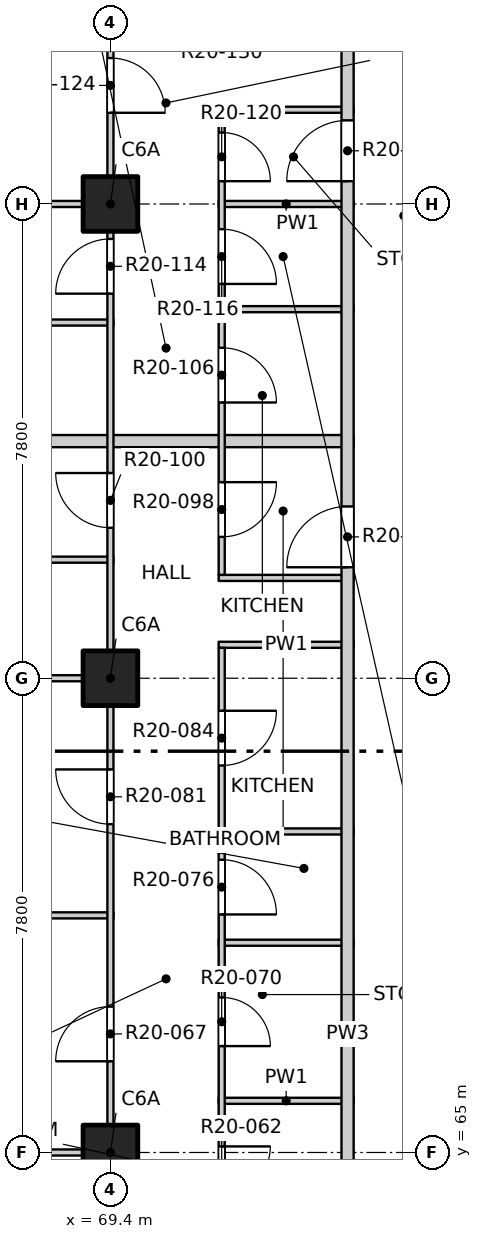
"""IFC4 building model, lengths in metres.
Left out: names, types, materials, properties, quantities, classifications, styles, units other than length and angle.
Written with IfcOpenShell. Run it as: python <this file> out.ifc"""

import sys

from ifc_helpers import new_model, si_unit, direction, frame, frame_2d, origin, origin_2d, place, context, subcontext, project, spatial, rectangle, extrude, element, fill, save


model = new_model("IFC4")
c1 = context("Model", 3, precision=1e-05, world=origin(), true_north=direction((0.0, 1.0)))
c2 = subcontext(c1, "Body", "Model", "MODEL_VIEW")
j1 = project(units=[si_unit("LENGTHUNIT", "METRE"), si_unit("PLANEANGLEUNIT", "RADIAN")], contexts=[c1])
p1 = place(None, origin())
s1 = spatial("IfcSite", under=j1, at=p1, CompositionType="ELEMENT")
p2 = place(p1, origin())
s2 = spatial("IfcBuilding", under=s1, at=p2, CompositionType="ELEMENT")
p3 = place(p2, frame((0.0, 0.0, 204.1)))
s3 = spatial("IfcBuildingStorey", under=s2, at=p3, CompositionType="ELEMENT", Elevation=204.1)
for number, where, z_axis, x_axis in (
    (1, (69.4, 65.0, -0.25), (0.0, 0.0, 1.0), (1.0, 0.0, 0.0)),
    (2, (69.4, 72.8, -0.25), (0.0, 0.0, 1.0), (1.0, 0.0, 0.0)),
    (3, (69.4, 80.6, -0.25), (0.0, 0.0, 1.0), (1.0, 0.0, 0.0)),
):
    element("IfcColumn", number, at=place(p3, frame(where, z_axis=z_axis, x_axis=x_axis)), inside=s3, PredefinedType="COLUMN", context=c2, shape_type="SweptSolid", body=[
        extrude(rectangle(XDim=0.9, YDim=0.9, at=origin_2d()), origin(), (0.0, 0.0, 1.0), 3.4),
    ])
p4 = place(p3, frame((61.9, 65.0, 0.0), z_axis=(0.0, 0.0, 1.0), x_axis=(1.0, 0.0, 0.0)))
e4 = element("IfcWall", 4, at=p4, inside=s3, PredefinedType="PARTITIONING", context=c2, shape_type="SweptSolid", body=[
    extrude(rectangle(XDim=7.55, YDim=0.1, at=frame_2d((3.775, 0.0))), origin(), (0.0, 0.0, 1.0), 3.15),
])
for number, where, z_axis, x_axis in (
    (5, (71.18, 65.85, 0.0), (0.0, 0.0, 1.0), (1.0, 0.0, 0.0)),
    (6, (71.18, 68.45, 0.0), (0.0, 0.0, 1.0), (1.0, 0.0, 0.0)),
):
    element("IfcWall", number, at=place(p3, frame(where, z_axis=z_axis, x_axis=x_axis)), inside=s3, PredefinedType="PARTITIONING", context=c2, shape_type="SweptSolid", body=[
        extrude(rectangle(XDim=2.22, YDim=0.1, at=frame_2d((1.11, 0.0))), origin(), (0.0, 0.0, 1.0), 3.15),
    ])
p5 = place(p3, frame((61.9, 68.9, 0.0), z_axis=(0.0, 0.0, 1.0), x_axis=(1.0, 0.0, 0.0)))
e7 = element("IfcWall", 7, at=p5, inside=s3, PredefinedType="PARTITIONING", context=c2, shape_type="SweptSolid", body=[
    extrude(rectangle(XDim=7.55, YDim=0.1, at=frame_2d((3.775, 0.0))), origin(), (0.0, 0.0, 1.0), 2.55),
])
p6 = place(p3, frame((71.18, 70.28, 0.0), z_axis=(0.0, 0.0, 1.0), x_axis=(1.0, 0.0, 0.0)))
e8 = element("IfcWall", 8, at=p6, inside=s3, PredefinedType="PARTITIONING", context=c2, shape_type="SweptSolid", body=[
    extrude(rectangle(XDim=2.22, YDim=0.1, at=frame_2d((1.11, 0.0))), origin(), (0.0, 0.0, 1.0), 3.15),
])
p7 = place(p3, frame((61.9, 72.8, 0.0), z_axis=(0.0, 0.0, 1.0), x_axis=(1.0, 0.0, 0.0)))
e9 = element("IfcWall", 9, at=p7, inside=s3, PredefinedType="PARTITIONING", context=c2, shape_type="SweptSolid", body=[
    extrude(rectangle(XDim=7.55, YDim=0.1, at=frame_2d((3.775, 0.0))), origin(), (0.0, 0.0, 1.0), 3.15),
])
for number, where, z_axis, x_axis in (
    (10, (71.18, 73.35, 0.0), (0.0, 0.0, 1.0), (1.0, 0.0, 0.0)),
    (11, (71.18, 74.45, 0.0), (0.0, 0.0, 1.0), (1.0, 0.0, 0.0)),
):
    element("IfcWall", number, at=place(p3, frame(where, z_axis=z_axis, x_axis=x_axis)), inside=s3, PredefinedType="PARTITIONING", context=c2, shape_type="SweptSolid", body=[
        extrude(rectangle(XDim=2.22, YDim=0.1, at=frame_2d((1.11, 0.0))), origin(), (0.0, 0.0, 1.0), 3.15),
    ])
p8 = place(p3, frame((65.75, 74.75, 0.0), z_axis=(0.0, 0.0, 1.0), x_axis=(1.0, 0.0, 0.0)))
e12 = element("IfcWall", 12, at=p8, inside=s3, PredefinedType="PARTITIONING", context=c2, shape_type="SweptSolid", body=[
    extrude(rectangle(XDim=3.7, YDim=0.1, at=frame_2d((1.85, 0.0))), origin(), (0.0, 0.0, 1.0), 3.15),
])
p9 = place(p3, frame((61.9, 76.7, 0.0), z_axis=(0.0, 0.0, 1.0), x_axis=(1.0, 0.0, 0.0)))
e13 = element("IfcWall", 13, at=p9, inside=s3, PredefinedType="PARTITIONING", context=c2, shape_type="SweptSolid", body=[
    extrude(rectangle(XDim=11.5, YDim=0.2, at=frame_2d((5.75, 0.0))), origin(), (0.0, 0.0, 1.0), 2.55),
])
p10 = place(p3, frame((65.75, 78.65, 0.0), z_axis=(0.0, 0.0, 1.0), x_axis=(1.0, 0.0, 0.0)))
e14 = element("IfcWall", 14, at=p10, inside=s3, PredefinedType="PARTITIONING", context=c2, shape_type="SweptSolid", body=[
    extrude(rectangle(XDim=3.7, YDim=0.1, at=frame_2d((1.85, 0.0))), origin(), (0.0, 0.0, 1.0), 3.15),
])
p11 = place(p3, frame((71.18, 78.87, 0.0), z_axis=(0.0, 0.0, 1.0), x_axis=(1.0, 0.0, 0.0)))
e15 = element("IfcWall", 15, at=p11, inside=s3, PredefinedType="PARTITIONING", context=c2, shape_type="SweptSolid", body=[
    extrude(rectangle(XDim=2.22, YDim=0.1, at=frame_2d((1.11, 0.0))), origin(), (0.0, 0.0, 1.0), 3.15),
])
p12 = place(p3, frame((61.9, 80.6, 0.0), z_axis=(0.0, 0.0, 1.0), x_axis=(1.0, 0.0, 0.0)))
e16 = element("IfcWall", 16, at=p12, inside=s3, PredefinedType="PARTITIONING", context=c2, shape_type="SweptSolid", body=[
    extrude(rectangle(XDim=7.55, YDim=0.1, at=frame_2d((3.775, 0.0))), origin(), (0.0, 0.0, 1.0), 3.15),
])
for number, where, z_axis, x_axis in (
    (17, (71.18, 80.6, 0.0), (0.0, 0.0, 1.0), (1.0, 0.0, 0.0)),
    (18, (71.18, 82.15, 0.0), (0.0, 0.0, 1.0), (1.0, 0.0, 0.0)),
):
    element("IfcWall", number, at=place(p3, frame(where, z_axis=z_axis, x_axis=x_axis)), inside=s3, PredefinedType="PARTITIONING", context=c2, shape_type="SweptSolid", body=[
        extrude(rectangle(XDim=2.22, YDim=0.1, at=frame_2d((1.11, 0.0))), origin(), (0.0, 0.0, 1.0), 3.15),
    ])
p13 = place(p3, frame((69.4, 41.9, 0.0), z_axis=(0.0, 0.0, 1.0), x_axis=(0.0, 1.0, 0.0)))
e19 = element("IfcWall", 19, at=p13, inside=s3, PredefinedType="PARTITIONING", context=c2, shape_type="SweptSolid", body=[
    extrude(rectangle(XDim=46.2, YDim=0.1, at=frame_2d((23.1, 0.0))), origin(), (0.0, 0.0, 1.0), 3.15),
])
p14 = place(p13, frame((1.2, 0.0, 0.0)))
e20 = element("IfcOpeningElement", 20, at=p14, cuts=e19, PredefinedType="OPENING", context=c2, shape_type="SweptSolid", body=[
    extrude(rectangle(XDim=0.9, YDim=2.1, at=frame_2d((0.45, 1.05))), frame((0.0, 0.06, 0.0), z_axis=(0.0, -1.0, 0.0), x_axis=(1.0, 0.0, 0.0)), (0.0, 0.0, 1.0), 0.12),
])
p15 = place(p13, frame((5.1, 0.0, 0.0)))
e21 = element("IfcOpeningElement", 21, at=p15, cuts=e19, PredefinedType="OPENING", context=c2, shape_type="SweptSolid", body=[
    extrude(rectangle(XDim=0.9, YDim=2.1, at=frame_2d((0.45, 1.05))), frame((0.0, 0.06, 0.0), z_axis=(0.0, -1.0, 0.0), x_axis=(1.0, 0.0, 0.0)), (0.0, 0.0, 1.0), 0.12),
])
p16 = place(p13, frame((9.975, 0.0, 0.0)))
e22 = element("IfcOpeningElement", 22, at=p16, cuts=e19, PredefinedType="OPENING", context=c2, shape_type="SweptSolid", body=[
    extrude(rectangle(XDim=0.9, YDim=2.1, at=frame_2d((0.45, 1.05))), frame((0.0, 0.06, 0.0), z_axis=(0.0, -1.0, 0.0), x_axis=(1.0, 0.0, 0.0)), (0.0, 0.0, 1.0), 0.12),
])
p17 = place(p13, frame((12.9, 0.0, 0.0)))
e23 = element("IfcOpeningElement", 23, at=p17, cuts=e19, PredefinedType="OPENING", context=c2, shape_type="SweptSolid", body=[
    extrude(rectangle(XDim=0.9, YDim=2.1, at=frame_2d((0.45, 1.05))), frame((0.0, 0.06, 0.0), z_axis=(0.0, -1.0, 0.0), x_axis=(1.0, 0.0, 0.0)), (0.0, 0.0, 1.0), 0.12),
])
p18 = place(p13, frame((17.775, 0.0, 0.0)))
e24 = element("IfcOpeningElement", 24, at=p18, cuts=e19, PredefinedType="OPENING", context=c2, shape_type="SweptSolid", body=[
    extrude(rectangle(XDim=0.9, YDim=2.1, at=frame_2d((0.45, 1.05))), frame((0.0, 0.06, 0.0), z_axis=(0.0, -1.0, 0.0), x_axis=(1.0, 0.0, 0.0)), (0.0, 0.0, 1.0), 0.12),
])
p19 = place(p13, frame((21.625, 0.0, 0.0)))
e25 = element("IfcOpeningElement", 25, at=p19, cuts=e19, PredefinedType="OPENING", context=c2, shape_type="SweptSolid", body=[
    extrude(rectangle(XDim=0.9, YDim=2.1, at=frame_2d((0.45, 1.05))), frame((0.0, 0.06, 0.0), z_axis=(0.0, -1.0, 0.0), x_axis=(1.0, 0.0, 0.0)), (0.0, 0.0, 1.0), 0.12),
])
p20 = place(p13, frame((24.6, 0.0, 0.0)))
e26 = element("IfcOpeningElement", 26, at=p20, cuts=e19, PredefinedType="OPENING", context=c2, shape_type="SweptSolid", body=[
    extrude(rectangle(XDim=0.9, YDim=2.1, at=frame_2d((0.45, 1.05))), frame((0.0, 0.06, 0.0), z_axis=(0.0, -1.0, 0.0), x_axis=(1.0, 0.0, 0.0)), (0.0, 0.0, 1.0), 0.12),
])
p21 = place(p13, frame((28.5, 0.0, 0.0)))
e27 = element("IfcOpeningElement", 27, at=p21, cuts=e19, PredefinedType="OPENING", context=c2, shape_type="SweptSolid", body=[
    extrude(rectangle(XDim=0.9, YDim=2.1, at=frame_2d((0.45, 1.05))), frame((0.0, 0.06, 0.0), z_axis=(0.0, -1.0, 0.0), x_axis=(1.0, 0.0, 0.0)), (0.0, 0.0, 1.0), 0.12),
])
p22 = place(p13, frame((33.375, 0.0, 0.0)))
e28 = element("IfcOpeningElement", 28, at=p22, cuts=e19, PredefinedType="OPENING", context=c2, shape_type="SweptSolid", body=[
    extrude(rectangle(XDim=0.9, YDim=2.1, at=frame_2d((0.45, 1.05))), frame((0.0, 0.06, 0.0), z_axis=(0.0, -1.0, 0.0), x_axis=(1.0, 0.0, 0.0)), (0.0, 0.0, 1.0), 0.12),
])
p23 = place(p13, frame((37.225, 0.0, 0.0)))
e29 = element("IfcOpeningElement", 29, at=p23, cuts=e19, PredefinedType="OPENING", context=c2, shape_type="SweptSolid", body=[
    extrude(rectangle(XDim=0.9, YDim=2.1, at=frame_2d((0.45, 1.05))), frame((0.0, 0.06, 0.0), z_axis=(0.0, -1.0, 0.0), x_axis=(1.0, 0.0, 0.0)), (0.0, 0.0, 1.0), 0.12),
])
p24 = place(p13, frame((40.2, 0.0, 0.0)))
e30 = element("IfcOpeningElement", 30, at=p24, cuts=e19, PredefinedType="OPENING", context=c2, shape_type="SweptSolid", body=[
    extrude(rectangle(XDim=0.9, YDim=2.1, at=frame_2d((0.45, 1.05))), frame((0.0, 0.06, 0.0), z_axis=(0.0, -1.0, 0.0), x_axis=(1.0, 0.0, 0.0)), (0.0, 0.0, 1.0), 0.12),
])
p25 = place(p13, frame((44.1, 0.0, 0.0)))
e31 = element("IfcOpeningElement", 31, at=p25, cuts=e19, PredefinedType="OPENING", context=c2, shape_type="SweptSolid", body=[
    extrude(rectangle(XDim=0.9, YDim=2.1, at=frame_2d((0.45, 1.05))), frame((0.0, 0.06, 0.0), z_axis=(0.0, -1.0, 0.0), x_axis=(1.0, 0.0, 0.0)), (0.0, 0.0, 1.0), 0.12),
])
p26 = place(p3, frame((71.23, 55.05, 0.0), z_axis=(0.0, 0.0, 1.0), x_axis=(0.0, 1.0, 0.0)))
e32 = element("IfcWall", 32, at=p26, inside=s3, PredefinedType="PARTITIONING", context=c2, shape_type="SweptSolid", body=[
    extrude(rectangle(XDim=18.25, YDim=0.1, at=frame_2d((9.125, 0.0))), origin(), (0.0, 0.0, 1.0), 3.15),
])
p27 = place(p26, frame((0.4, 0.0, 0.0)))
e33 = element("IfcOpeningElement", 33, at=p27, cuts=e32, PredefinedType="OPENING", context=c2, shape_type="SweptSolid", body=[
    extrude(rectangle(XDim=0.9, YDim=2.1, at=frame_2d((0.45, 1.05))), frame((0.0, 0.06, 0.0), z_axis=(0.0, -1.0, 0.0), x_axis=(1.0, 0.0, 0.0)), (0.0, 0.0, 1.0), 0.12),
])
p28 = place(p26, frame((2.425, 0.0, 0.0)))
e34 = element("IfcOpeningElement", 34, at=p28, cuts=e32, PredefinedType="OPENING", context=c2, shape_type="SweptSolid", body=[
    extrude(rectangle(XDim=0.8, YDim=2.1, at=frame_2d((0.4, 1.05))), frame((0.0, 0.06, 0.0), z_axis=(0.0, -1.0, 0.0), x_axis=(1.0, 0.0, 0.0)), (0.0, 0.0, 1.0), 0.12),
])
p29 = place(p26, frame((4.575, 0.0, 0.0)))
e35 = element("IfcOpeningElement", 35, at=p29, cuts=e32, PredefinedType="OPENING", context=c2, shape_type="SweptSolid", body=[
    extrude(rectangle(XDim=0.8, YDim=2.1, at=frame_2d((0.4, 1.05))), frame((0.0, 0.06, 0.0), z_axis=(0.0, -1.0, 0.0), x_axis=(1.0, 0.0, 0.0)), (0.0, 0.0, 1.0), 0.12),
])
p30 = place(p26, frame((6.875, 0.0, 0.0)))
e36 = element("IfcOpeningElement", 36, at=p30, cuts=e32, PredefinedType="OPENING", context=c2, shape_type="SweptSolid", body=[
    extrude(rectangle(XDim=0.8, YDim=2.1, at=frame_2d((0.4, 1.05))), frame((0.0, 0.06, 0.0), z_axis=(0.0, -1.0, 0.0), x_axis=(1.0, 0.0, 0.0)), (0.0, 0.0, 1.0), 0.12),
])
p31 = place(p26, frame((9.25, 0.0, 0.0)))
e37 = element("IfcOpeningElement", 37, at=p31, cuts=e32, PredefinedType="OPENING", context=c2, shape_type="SweptSolid", body=[
    extrude(rectangle(XDim=0.8, YDim=2.1, at=frame_2d((0.4, 1.05))), frame((0.0, 0.06, 0.0), z_axis=(0.0, -1.0, 0.0), x_axis=(1.0, 0.0, 0.0)), (0.0, 0.0, 1.0), 0.12),
])
p32 = place(p26, frame((11.7, 0.0, 0.0)))
e38 = element("IfcOpeningElement", 38, at=p32, cuts=e32, PredefinedType="OPENING", context=c2, shape_type="SweptSolid", body=[
    extrude(rectangle(XDim=0.8, YDim=2.1, at=frame_2d((0.4, 1.05))), frame((0.0, 0.06, 0.0), z_axis=(0.0, -1.0, 0.0), x_axis=(1.0, 0.0, 0.0)), (0.0, 0.0, 1.0), 0.12),
])
p33 = place(p26, frame((13.865, 0.0, 0.0)))
e39 = element("IfcOpeningElement", 39, at=p33, cuts=e32, PredefinedType="OPENING", context=c2, shape_type="SweptSolid", body=[
    extrude(rectangle(XDim=0.9, YDim=2.1, at=frame_2d((0.45, 1.05))), frame((0.0, 0.06, 0.0), z_axis=(0.0, -1.0, 0.0), x_axis=(1.0, 0.0, 0.0)), (0.0, 0.0, 1.0), 0.12),
])
p34 = place(p26, frame((16.315, 0.0, 0.0)))
e40 = element("IfcOpeningElement", 40, at=p34, cuts=e32, PredefinedType="OPENING", context=c2, shape_type="SweptSolid", body=[
    extrude(rectangle(XDim=0.9, YDim=2.1, at=frame_2d((0.45, 1.05))), frame((0.0, 0.06, 0.0), z_axis=(0.0, -1.0, 0.0), x_axis=(1.0, 0.0, 0.0)), (0.0, 0.0, 1.0), 0.12),
])
p35 = place(p3, frame((71.23, 74.5, 0.0), z_axis=(0.0, 0.0, 1.0), x_axis=(0.0, 1.0, 0.0)))
e41 = element("IfcWall", 41, at=p35, inside=s3, PredefinedType="PARTITIONING", context=c2, shape_type="SweptSolid", body=[
    extrude(rectangle(XDim=7.6, YDim=0.1, at=frame_2d((3.8, 0.0))), origin(), (0.0, 0.0, 1.0), 3.15),
])
p36 = place(p35, frame((0.625, 0.0, 0.0)))
e42 = element("IfcOpeningElement", 42, at=p36, cuts=e41, PredefinedType="OPENING", context=c2, shape_type="SweptSolid", body=[
    extrude(rectangle(XDim=0.9, YDim=2.1, at=frame_2d((0.45, 1.05))), frame((0.0, 0.06, 0.0), z_axis=(0.0, -1.0, 0.0), x_axis=(1.0, 0.0, 0.0)), (0.0, 0.0, 1.0), 0.12),
])
p37 = place(p35, frame((2.835, 0.0, 0.0)))
e43 = element("IfcOpeningElement", 43, at=p37, cuts=e41, PredefinedType="OPENING", context=c2, shape_type="SweptSolid", body=[
    extrude(rectangle(XDim=0.9, YDim=2.1, at=frame_2d((0.45, 1.05))), frame((0.0, 0.06, 0.0), z_axis=(0.0, -1.0, 0.0), x_axis=(1.0, 0.0, 0.0)), (0.0, 0.0, 1.0), 0.12),
])
p38 = place(p35, frame((4.785, 0.0, 0.0)))
e44 = element("IfcOpeningElement", 44, at=p38, cuts=e41, PredefinedType="OPENING", context=c2, shape_type="SweptSolid", body=[
    extrude(rectangle(XDim=0.9, YDim=2.1, at=frame_2d((0.45, 1.05))), frame((0.0, 0.06, 0.0), z_axis=(0.0, -1.0, 0.0), x_axis=(1.0, 0.0, 0.0)), (0.0, 0.0, 1.0), 0.12),
])
p39 = place(p35, frame((6.475, 0.0, 0.0)))
e45 = element("IfcOpeningElement", 45, at=p39, cuts=e41, PredefinedType="OPENING", context=c2, shape_type="SweptSolid", body=[
    extrude(rectangle(XDim=0.8, YDim=2.1, at=frame_2d((0.4, 1.05))), frame((0.0, 0.06, 0.0), z_axis=(0.0, -1.0, 0.0), x_axis=(1.0, 0.0, 0.0)), (0.0, 0.0, 1.0), 0.12),
])
p40 = place(p3, frame((73.3, 49.5, 0.0), z_axis=(0.0, 0.0, 1.0), x_axis=(0.0, 1.0, 0.0)))
e46 = element("IfcWall", 46, at=p40, inside=s3, PredefinedType="PARTITIONING", context=c2, shape_type="SweptSolid", body=[
    extrude(rectangle(XDim=34.9, YDim=0.2, at=frame_2d((17.45, 0.0))), origin(), (0.0, 0.0, 1.0), 3.15),
])
p41 = place(p40, frame((3.225, 0.0, 0.0)))
e47 = element("IfcOpeningElement", 47, at=p41, cuts=e46, PredefinedType="OPENING", context=c2, shape_type="SweptSolid", body=[
    extrude(rectangle(XDim=1.0, YDim=2.1, at=frame_2d((0.5, 1.05))), frame((0.0, 0.11, 0.0), z_axis=(0.0, -1.0, 0.0), x_axis=(1.0, 0.0, 0.0)), (0.0, 0.0, 1.0), 0.22),
])
p42 = place(p40, frame((25.125, 0.0, 0.0)))
e48 = element("IfcOpeningElement", 48, at=p42, cuts=e46, PredefinedType="OPENING", context=c2, shape_type="SweptSolid", body=[
    extrude(rectangle(XDim=1.0, YDim=2.1, at=frame_2d((0.5, 1.05))), frame((0.0, 0.11, 0.0), z_axis=(0.0, -1.0, 0.0), x_axis=(1.0, 0.0, 0.0)), (0.0, 0.0, 1.0), 0.22),
])
p43 = place(p40, frame((31.475, 0.0, 0.0)))
e49 = element("IfcOpeningElement", 49, at=p43, cuts=e46, PredefinedType="OPENING", context=c2, shape_type="SweptSolid", body=[
    extrude(rectangle(XDim=1.0, YDim=2.1, at=frame_2d((0.5, 1.05))), frame((0.0, 0.11, 0.0), z_axis=(0.0, -1.0, 0.0), x_axis=(1.0, 0.0, 0.0)), (0.0, 0.0, 1.0), 0.22),
])
p44 = place(p31, origin())
e50 = element("IfcDoor", 50, at=p44, inside=s3, OperationType="SINGLE_SWING_LEFT", PredefinedType="DOOR", context=c2, shape_type="SweptSolid", body=[
    extrude(rectangle(XDim=0.8, YDim=2.1, at=frame_2d((0.4, 1.05))), frame((0.0, 0.025, 0.0), z_axis=(0.0, -1.0, 0.0), x_axis=(1.0, 0.0, 0.0)), (0.0, 0.0, 1.0), 0.05),
])
fill(e37, e50)
p45 = place(p20, origin())
e51 = element("IfcDoor", 51, at=p45, inside=s3, OperationType="SINGLE_SWING_LEFT", PredefinedType="DOOR", context=c2, shape_type="SweptSolid", body=[
    extrude(rectangle(XDim=0.9, YDim=2.1, at=frame_2d((0.45, 1.05))), frame((0.0, 0.025, 0.0), z_axis=(0.0, -1.0, 0.0), x_axis=(1.0, 0.0, 0.0)), (0.0, 0.0, 1.0), 0.05),
])
fill(e26, e51)
p46 = place(p32, origin())
e52 = element("IfcDoor", 52, at=p46, inside=s3, OperationType="SINGLE_SWING_RIGHT", PredefinedType="DOOR", context=c2, shape_type="SweptSolid", body=[
    extrude(rectangle(XDim=0.8, YDim=2.1, at=frame_2d((0.4, 1.05))), frame((0.0, 0.025, 0.0), z_axis=(0.0, -1.0, 0.0), x_axis=(1.0, 0.0, 0.0)), (0.0, 0.0, 1.0), 0.05),
])
fill(e38, e52)
p47 = place(p33, origin())
e53 = element("IfcDoor", 53, at=p47, inside=s3, OperationType="SINGLE_SWING_RIGHT", PredefinedType="DOOR", context=c2, shape_type="SweptSolid", body=[
    extrude(rectangle(XDim=0.9, YDim=2.1, at=frame_2d((0.45, 1.05))), frame((0.0, 0.025, 0.0), z_axis=(0.0, -1.0, 0.0), x_axis=(1.0, 0.0, 0.0)), (0.0, 0.0, 1.0), 0.05),
])
fill(e39, e53)
p48 = place(p21, origin())
e54 = element("IfcDoor", 54, at=p48, inside=s3, OperationType="SINGLE_SWING_RIGHT", PredefinedType="DOOR", context=c2, shape_type="SweptSolid", body=[
    extrude(rectangle(XDim=0.9, YDim=2.1, at=frame_2d((0.45, 1.05))), frame((0.0, 0.025, 0.0), z_axis=(0.0, -1.0, 0.0), x_axis=(1.0, 0.0, 0.0)), (0.0, 0.0, 1.0), 0.05),
])
fill(e27, e54)
p49 = place(p34, origin())
e55 = element("IfcDoor", 55, at=p49, inside=s3, OperationType="SINGLE_SWING_LEFT", PredefinedType="DOOR", context=c2, shape_type="SweptSolid", body=[
    extrude(rectangle(XDim=0.9, YDim=2.1, at=frame_2d((0.45, 1.05))), frame((0.0, 0.025, 0.0), z_axis=(0.0, -1.0, 0.0), x_axis=(1.0, 0.0, 0.0)), (0.0, 0.0, 1.0), 0.05),
])
fill(e40, e55)
p50 = place(p42, origin())
e56 = element("IfcDoor", 56, at=p50, inside=s3, OperationType="SINGLE_SWING_RIGHT", PredefinedType="DOOR", context=c2, shape_type="SweptSolid", body=[
    extrude(rectangle(XDim=1.0, YDim=2.1, at=frame_2d((0.5, 1.05))), frame((0.0, 0.025, 0.0), z_axis=(0.0, -1.0, 0.0), x_axis=(1.0, 0.0, 0.0)), (0.0, 0.0, 1.0), 0.05),
])
fill(e48, e56)
p51 = place(p36, origin())
e57 = element("IfcDoor", 57, at=p51, inside=s3, OperationType="SINGLE_SWING_LEFT", PredefinedType="DOOR", context=c2, shape_type="SweptSolid", body=[
    extrude(rectangle(XDim=0.9, YDim=2.1, at=frame_2d((0.45, 1.05))), frame((0.0, 0.025, 0.0), z_axis=(0.0, -1.0, 0.0), x_axis=(1.0, 0.0, 0.0)), (0.0, 0.0, 1.0), 0.05),
])
fill(e42, e57)
p52 = place(p22, origin())
e58 = element("IfcDoor", 58, at=p52, inside=s3, OperationType="SINGLE_SWING_RIGHT", PredefinedType="DOOR", context=c2, shape_type="SweptSolid", body=[
    extrude(rectangle(XDim=0.9, YDim=2.1, at=frame_2d((0.45, 1.05))), frame((0.0, 0.025, 0.0), z_axis=(0.0, -1.0, 0.0), x_axis=(1.0, 0.0, 0.0)), (0.0, 0.0, 1.0), 0.05),
])
fill(e28, e58)
p53 = place(p37, origin())
e59 = element("IfcDoor", 59, at=p53, inside=s3, OperationType="SINGLE_SWING_RIGHT", PredefinedType="DOOR", context=c2, shape_type="SweptSolid", body=[
    extrude(rectangle(XDim=0.9, YDim=2.1, at=frame_2d((0.45, 1.05))), frame((0.0, 0.025, 0.0), z_axis=(0.0, -1.0, 0.0), x_axis=(1.0, 0.0, 0.0)), (0.0, 0.0, 1.0), 0.05),
])
fill(e43, e59)
p54 = place(p23, origin())
e60 = element("IfcDoor", 60, at=p54, inside=s3, OperationType="SINGLE_SWING_LEFT", PredefinedType="DOOR", context=c2, shape_type="SweptSolid", body=[
    extrude(rectangle(XDim=0.9, YDim=2.1, at=frame_2d((0.45, 1.05))), frame((0.0, 0.025, 0.0), z_axis=(0.0, -1.0, 0.0), x_axis=(1.0, 0.0, 0.0)), (0.0, 0.0, 1.0), 0.05),
])
fill(e29, e60)
p55 = place(p38, origin())
e61 = element("IfcDoor", 61, at=p55, inside=s3, OperationType="SINGLE_SWING_RIGHT", PredefinedType="DOOR", context=c2, shape_type="SweptSolid", body=[
    extrude(rectangle(XDim=0.9, YDim=2.1, at=frame_2d((0.45, 1.05))), frame((0.0, 0.025, 0.0), z_axis=(0.0, -1.0, 0.0), x_axis=(1.0, 0.0, 0.0)), (0.0, 0.0, 1.0), 0.05),
])
fill(e44, e61)
p56 = place(p39, origin())
e62 = element("IfcDoor", 62, at=p56, inside=s3, OperationType="SINGLE_SWING_RIGHT", PredefinedType="DOOR", context=c2, shape_type="SweptSolid", body=[
    extrude(rectangle(XDim=0.8, YDim=2.1, at=frame_2d((0.4, 1.05))), frame((0.0, 0.025, 0.0), z_axis=(0.0, -1.0, 0.0), x_axis=(1.0, 0.0, 0.0)), (0.0, 0.0, 1.0), 0.05),
])
fill(e45, e62)
p57 = place(p43, origin())
e63 = element("IfcDoor", 63, at=p57, inside=s3, OperationType="SINGLE_SWING_LEFT", PredefinedType="DOOR", context=c2, shape_type="SweptSolid", body=[
    extrude(rectangle(XDim=1.0, YDim=2.1, at=frame_2d((0.5, 1.05))), frame((0.0, 0.025, 0.0), z_axis=(0.0, -1.0, 0.0), x_axis=(1.0, 0.0, 0.0)), (0.0, 0.0, 1.0), 0.05),
])
fill(e49, e63)
p58 = place(p24, origin())
e64 = element("IfcDoor", 64, at=p58, inside=s3, OperationType="SINGLE_SWING_RIGHT", PredefinedType="DOOR", context=c2, shape_type="SweptSolid", body=[
    extrude(rectangle(XDim=0.9, YDim=2.1, at=frame_2d((0.45, 1.05))), frame((0.0, 0.025, 0.0), z_axis=(0.0, -1.0, 0.0), x_axis=(1.0, 0.0, 0.0)), (0.0, 0.0, 1.0), 0.05),
])
fill(e30, e64)
save(model, sys.argv[1])
